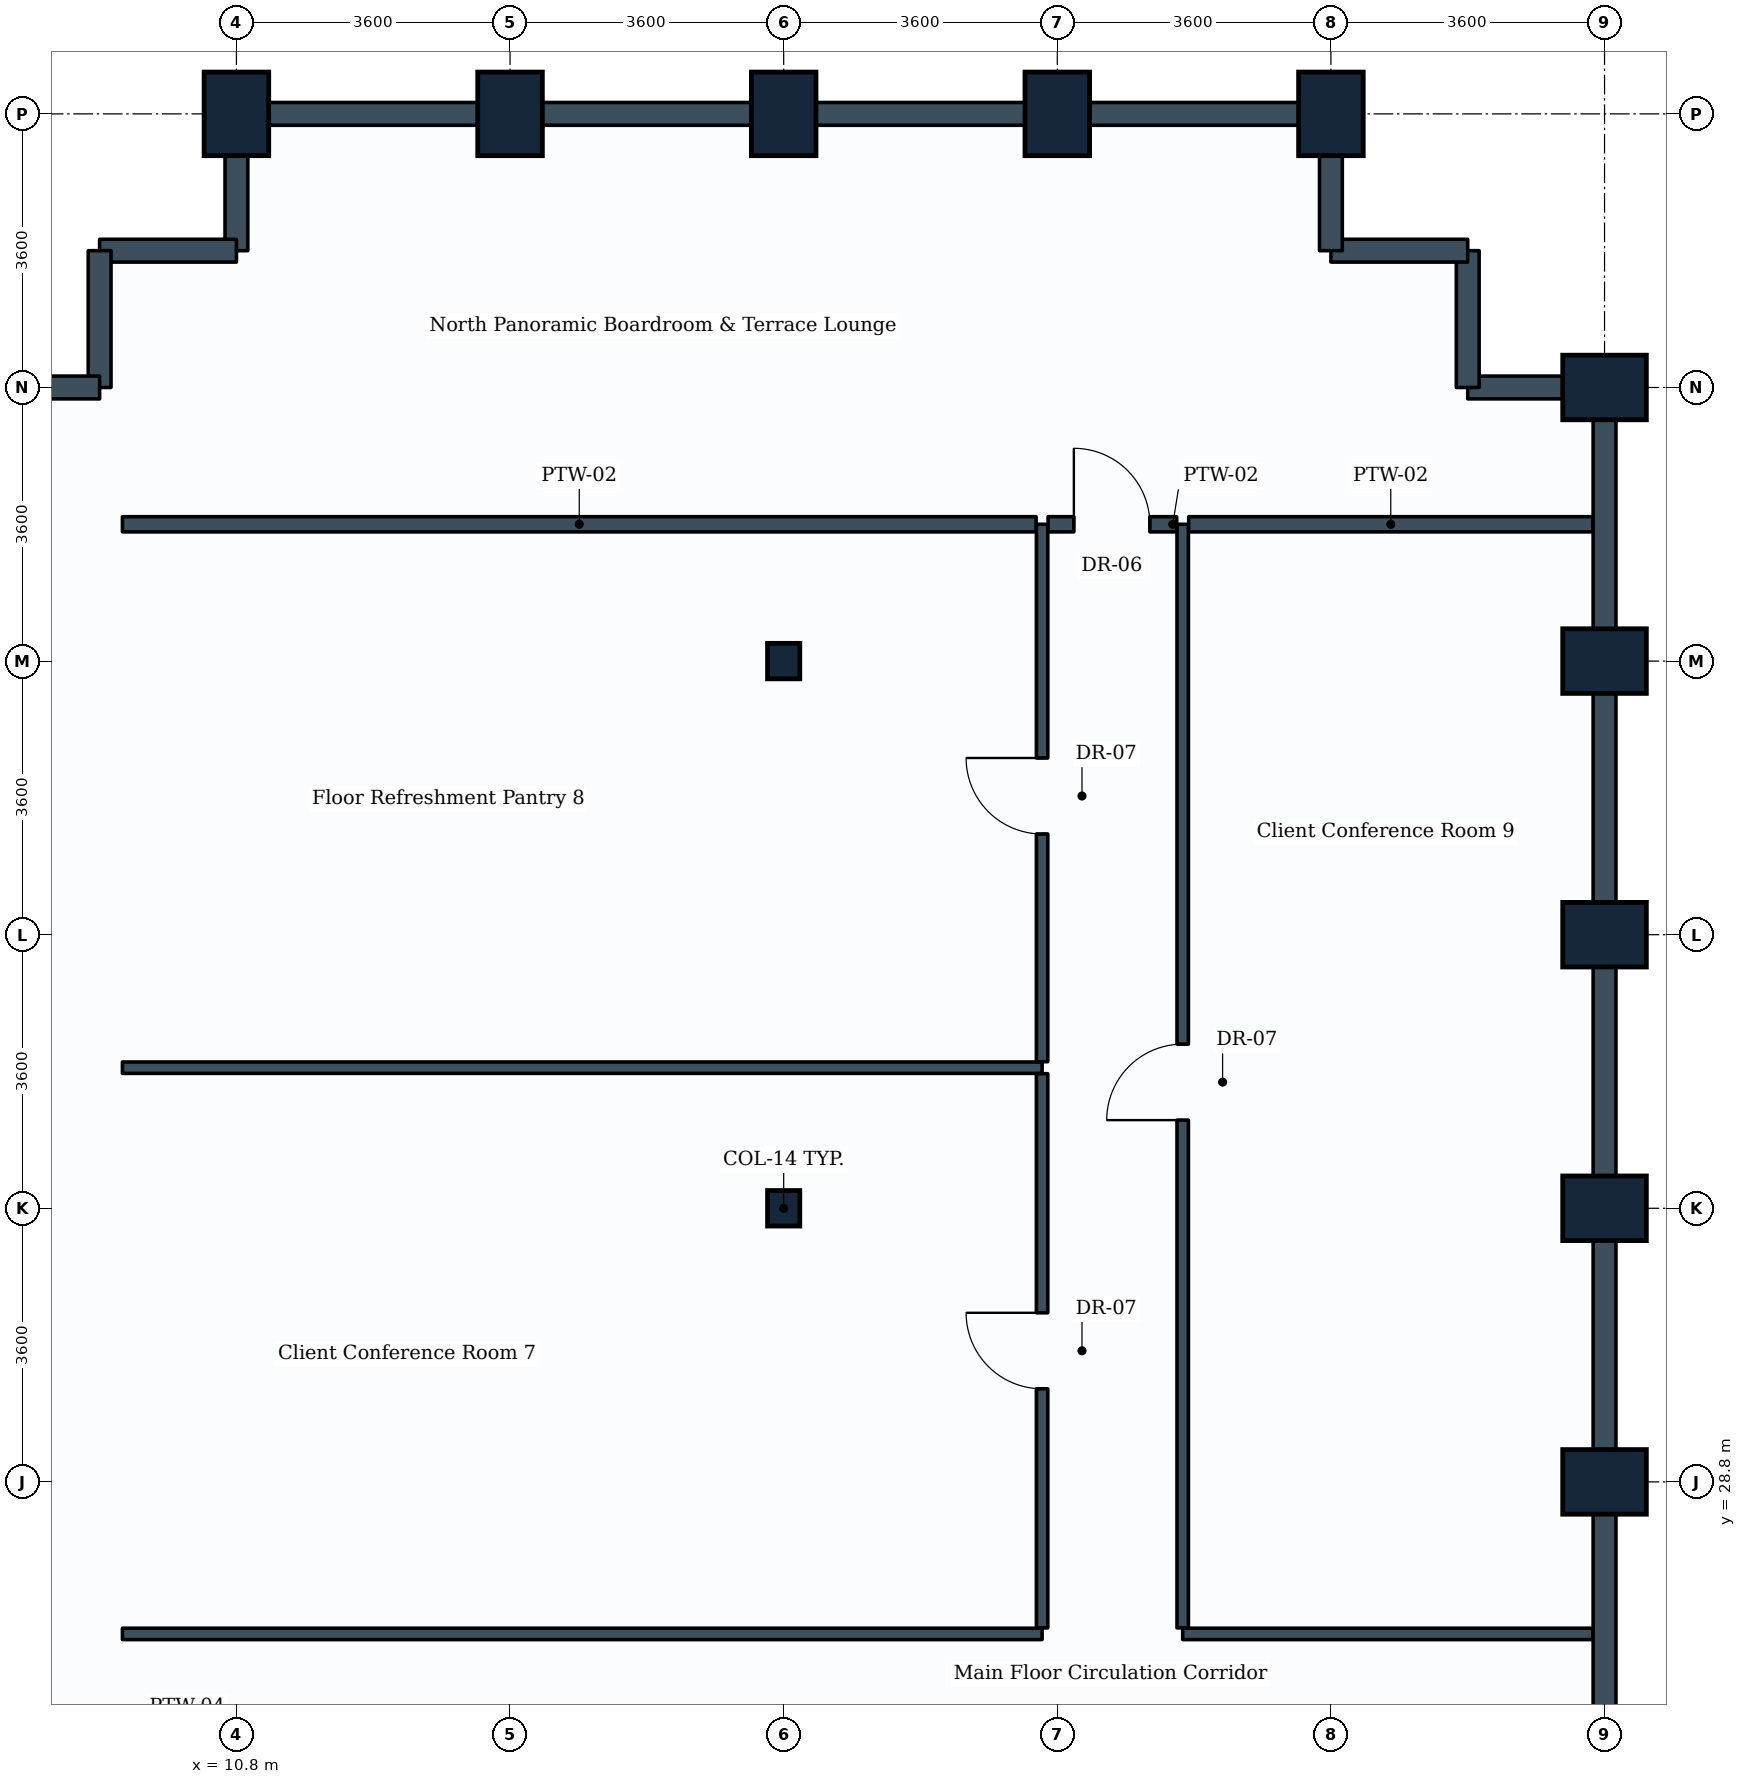
"""IFC4 building model, lengths in metres.
Left out: names, types, materials, properties, quantities, classifications, styles, units other than length and angle.
Written with IfcOpenShell. Run it as: python <this file> out.ifc"""

import sys

from ifc_helpers import new_model, si_unit, direction, frame, frame_2d, origin, origin_2d, place, context, subcontext, project, spatial, rectangle, i_section, extrude, element, fill, save


model = new_model("IFC4")
c1 = context("Model", 3, precision=1e-05, world=origin(), true_north=direction((0.0, 1.0)))
c2 = subcontext(c1, "Body", "Model", "MODEL_VIEW")
j1 = project(units=[si_unit("LENGTHUNIT", "METRE"), si_unit("PLANEANGLEUNIT", "RADIAN")], contexts=[c1])
p1 = place(None, origin())
s1 = spatial("IfcSite", under=j1, at=p1, CompositionType="ELEMENT")
p2 = place(p1, origin())
s2 = spatial("IfcBuilding", under=s1, at=p2, CompositionType="ELEMENT")
p3 = place(p2, frame((0.0, 0.0, 84.0)))
s3 = spatial("IfcBuildingStorey", under=s2, at=p3, CompositionType="ELEMENT", Elevation=84.0)
for number, where, z_axis, x_axis in (
    (1, (10.8, 46.8, 0.0), (0.0, 0.0, 1.0), (1.0, 0.0, 0.0)),
    (2, (14.4, 46.8, 0.0), (0.0, 0.0, 1.0), (1.0, 0.0, 0.0)),
):
    element("IfcColumn", number, at=place(p3, frame(where, z_axis=z_axis, x_axis=x_axis)), inside=s3, PredefinedType="COLUMN", context=c2, shape_type="SweptSolid", body=[
        extrude(rectangle(XDim=0.85, YDim=1.1, at=origin_2d()), origin(), (0.0, 0.0, 1.0), 3.9),
    ])
for number, where, z_axis, x_axis in (
    (3, (18.0, 32.4, 0.0), (0.0, 0.0, 1.0), (1.0, 0.0, 0.0)),
    (4, (18.0, 39.6, 0.0), (0.0, 0.0, 1.0), (1.0, 0.0, 0.0)),
):
    element("IfcColumn", number, at=place(p3, frame(where, z_axis=z_axis, x_axis=x_axis)), inside=s3, PredefinedType="COLUMN", context=c2, shape_type="SweptSolid", body=[
        extrude(i_section(OverallWidth=0.424, OverallDepth=0.467, WebThickness=0.033, FlangeThickness=0.053, FilletRadius=0.015, at=origin_2d()), origin(), (0.0, 0.0, 1.0), 3.9),
    ])
for number, where, z_axis, x_axis in (
    (5, (18.0, 46.8, 0.0), (0.0, 0.0, 1.0), (1.0, 0.0, 0.0)),
    (6, (21.6, 46.8, 0.0), (0.0, 0.0, 1.0), (1.0, 0.0, 0.0)),
    (7, (25.2, 46.8, 0.0), (0.0, 0.0, 1.0), (1.0, 0.0, 0.0)),
    (8, (28.8, 28.8, 0.0), (0.0, 0.0, 1.0), (0.0, 1.0, 0.0)),
    (9, (28.8, 32.4, 0.0), (0.0, 0.0, 1.0), (0.0, 1.0, 0.0)),
    (10, (28.8, 36.0, 0.0), (0.0, 0.0, 1.0), (0.0, 1.0, 0.0)),
    (11, (28.8, 39.6, 0.0), (0.0, 0.0, 1.0), (0.0, 1.0, 0.0)),
    (12, (28.8, 43.2, 0.0), (0.0, 0.0, 1.0), (0.0, 1.0, 0.0)),
):
    element("IfcColumn", number, at=place(p3, frame(where, z_axis=z_axis, x_axis=x_axis)), inside=s3, PredefinedType="COLUMN", context=c2, shape_type="SweptSolid", body=[
        extrude(rectangle(XDim=0.85, YDim=1.1, at=origin_2d()), origin(), (0.0, 0.0, 1.0), 3.9),
    ])
p4 = place(p3, frame((28.8, 28.8, 0.0), z_axis=(0.0, 0.0, 1.0), x_axis=(0.0, -1.0, 0.0)))
e13 = element("IfcWall", 13, at=p4, inside=s3, PredefinedType="STANDARD", context=c2, shape_type="SweptSolid", body=[
    extrude(rectangle(XDim=3.6, YDim=0.3, at=frame_2d((1.8, 0.0))), origin(), (0.0, 0.0, 1.0), 3.19),
])
p5 = place(p3, frame((28.8, 32.4, 0.0), z_axis=(0.0, 0.0, 1.0), x_axis=(0.0, -1.0, 0.0)))
e14 = element("IfcWall", 14, at=p5, inside=s3, PredefinedType="STANDARD", context=c2, shape_type="SweptSolid", body=[
    extrude(rectangle(XDim=3.6, YDim=0.3, at=frame_2d((1.8, 0.0))), origin(), (0.0, 0.0, 1.0), 2.93),
])
for number, where, z_axis, x_axis in (
    (15, (28.8, 36.0, 0.0), (0.0, 0.0, 1.0), (0.0, -1.0, 0.0)),
    (16, (28.8, 39.6, 0.0), (0.0, 0.0, 1.0), (0.0, -1.0, 0.0)),
):
    element("IfcWall", number, at=place(p3, frame(where, z_axis=z_axis, x_axis=x_axis)), inside=s3, PredefinedType="STANDARD", context=c2, shape_type="SweptSolid", body=[
        extrude(rectangle(XDim=3.6, YDim=0.3, at=frame_2d((1.8, 0.0))), origin(), (0.0, 0.0, 1.0), 2.93),
    ])
p6 = place(p3, frame((28.8, 43.2, 0.0), z_axis=(0.0, 0.0, 1.0), x_axis=(0.0, -1.0, 0.0)))
e17 = element("IfcWall", 17, at=p6, inside=s3, PredefinedType="STANDARD", context=c2, shape_type="SweptSolid", body=[
    extrude(rectangle(XDim=3.6, YDim=0.3, at=frame_2d((1.8, 0.0))), origin(), (0.0, 0.0, 1.0), 2.93),
])
p7 = place(p3, frame((27.0, 43.2, 0.0), z_axis=(0.0, 0.0, 1.0), x_axis=(1.0, 0.0, 0.0)))
e18 = element("IfcWall", 18, at=p7, inside=s3, PredefinedType="STANDARD", context=c2, shape_type="SweptSolid", body=[
    extrude(rectangle(XDim=1.8, YDim=0.3, at=frame_2d((0.9, 0.0))), origin(), (0.0, 0.0, 1.0), 2.93),
])
for number, where, z_axis, x_axis in (
    (19, (27.0, 43.2, 0.0), (0.0, 0.0, 1.0), (0.0, 1.0, 0.0)),
    (20, (25.2, 45.0, 0.0), (0.0, 0.0, 1.0), (1.0, 0.0, 0.0)),
):
    element("IfcWall", number, at=place(p3, frame(where, z_axis=z_axis, x_axis=x_axis)), inside=s3, PredefinedType="STANDARD", context=c2, shape_type="SweptSolid", body=[
        extrude(rectangle(XDim=1.8, YDim=0.3, at=frame_2d((0.9, 0.0))), origin(), (0.0, 0.0, 1.0), 3.635),
    ])
p8 = place(p3, frame((25.2, 45.0, 0.0), z_axis=(0.0, 0.0, 1.0), x_axis=(0.0, 1.0, 0.0)))
e21 = element("IfcWall", 21, at=p8, inside=s3, PredefinedType="STANDARD", context=c2, shape_type="SweptSolid", body=[
    extrude(rectangle(XDim=1.8, YDim=0.3, at=frame_2d((0.9, 0.0))), origin(), (0.0, 0.0, 1.0), 2.93),
])
p9 = place(p3, frame((21.6, 46.8, 0.0), z_axis=(0.0, 0.0, 1.0), x_axis=(1.0, 0.0, 0.0)))
e22 = element("IfcWall", 22, at=p9, inside=s3, PredefinedType="STANDARD", context=c2, shape_type="SweptSolid", body=[
    extrude(rectangle(XDim=3.6, YDim=0.3, at=frame_2d((1.8, 0.0))), origin(), (0.0, 0.0, 1.0), 2.93),
])
for number, where, z_axis, x_axis in (
    (23, (18.0, 46.8, 0.0), (0.0, 0.0, 1.0), (1.0, 0.0, 0.0)),
    (24, (14.4, 46.8, 0.0), (0.0, 0.0, 1.0), (1.0, 0.0, 0.0)),
):
    element("IfcWall", number, at=place(p3, frame(where, z_axis=z_axis, x_axis=x_axis)), inside=s3, PredefinedType="STANDARD", context=c2, shape_type="SweptSolid", body=[
        extrude(rectangle(XDim=3.6, YDim=0.3, at=frame_2d((1.8, 0.0))), origin(), (0.0, 0.0, 1.0), 2.93),
    ])
p10 = place(p3, frame((10.8, 46.8, 0.0), z_axis=(0.0, 0.0, 1.0), x_axis=(1.0, 0.0, 0.0)))
e25 = element("IfcWall", 25, at=p10, inside=s3, PredefinedType="STANDARD", context=c2, shape_type="SweptSolid", body=[
    extrude(rectangle(XDim=3.6, YDim=0.3, at=frame_2d((1.8, 0.0))), origin(), (0.0, 0.0, 1.0), 2.93),
])
p11 = place(p3, frame((10.8, 45.0, 0.0), z_axis=(0.0, 0.0, 1.0), x_axis=(0.0, 1.0, 0.0)))
e26 = element("IfcWall", 26, at=p11, inside=s3, PredefinedType="STANDARD", context=c2, shape_type="SweptSolid", body=[
    extrude(rectangle(XDim=1.8, YDim=0.3, at=frame_2d((0.9, 0.0))), origin(), (0.0, 0.0, 1.0), 2.93),
])
for number, where, z_axis, x_axis in (
    (27, (9.0, 45.0, 0.0), (0.0, 0.0, 1.0), (1.0, 0.0, 0.0)),
    (28, (9.0, 43.2, 0.0), (0.0, 0.0, 1.0), (0.0, 1.0, 0.0)),
):
    element("IfcWall", number, at=place(p3, frame(where, z_axis=z_axis, x_axis=x_axis)), inside=s3, PredefinedType="STANDARD", context=c2, shape_type="SweptSolid", body=[
        extrude(rectangle(XDim=1.8, YDim=0.3, at=frame_2d((0.9, 0.0))), origin(), (0.0, 0.0, 1.0), 3.635),
    ])
p12 = place(p3, frame((7.2, 43.2, 0.0), z_axis=(0.0, 0.0, 1.0), x_axis=(1.0, 0.0, 0.0)))
e29 = element("IfcWall", 29, at=p12, inside=s3, PredefinedType="STANDARD", context=c2, shape_type="SweptSolid", body=[
    extrude(rectangle(XDim=1.8, YDim=0.3, at=frame_2d((0.9, 0.0))), origin(), (0.0, 0.0, 1.0), 2.93),
])
for number, where, z_axis, x_axis in (
    (30, (9.3, 26.8, 0.0), (0.0, 0.0, 1.0), (1.0, 0.0, 0.0)),
    (31, (9.3, 34.25, 0.0), (0.0, 0.0, 1.0), (1.0, 0.0, 0.0)),
):
    element("IfcWall", number, at=place(p3, frame(where, z_axis=z_axis, x_axis=x_axis)), inside=s3, PredefinedType="PARTITIONING", context=c2, shape_type="SweptSolid", body=[
        extrude(rectangle(XDim=12.1, YDim=0.15, at=frame_2d((6.05, 0.0))), origin(), (0.0, 0.0, 1.0), 3.18),
    ])
p13 = place(p3, frame((21.4, 26.879, 0.0), z_axis=(0.0, 0.0, 1.0), x_axis=(0.0, 1.0, 0.0)))
e32 = element("IfcWall", 32, at=p13, inside=s3, PredefinedType="PARTITIONING", context=c2, shape_type="SweptSolid", body=[
    extrude(rectangle(XDim=7.292, YDim=0.15, at=frame_2d((3.646, 0.0))), origin(), (0.0, 0.0, 1.0), 3.19),
])
p14 = place(p13, frame((3.146, 0.0, 0.0)))
e33 = element("IfcOpeningElement", 33, at=p14, cuts=e32, PredefinedType="OPENING", context=c2, shape_type="SweptSolid", body=[
    extrude(rectangle(XDim=1.0, YDim=2.1, at=frame_2d((0.5, 1.05))), frame((0.0, 0.085, 0.0), z_axis=(0.0, -1.0, 0.0), x_axis=(1.0, 0.0, 0.0)), (0.0, 0.0, 1.0), 0.17),
])
p15 = place(p3, frame((21.4, 34.329, 0.0), z_axis=(0.0, 0.0, 1.0), x_axis=(0.0, 1.0, 0.0)))
e34 = element("IfcWall", 34, at=p15, inside=s3, PredefinedType="PARTITIONING", context=c2, shape_type="SweptSolid", body=[
    extrude(rectangle(XDim=7.071, YDim=0.15, at=frame_2d((3.535, 0.0))), origin(), (0.0, 0.0, 1.0), 3.18),
])
p16 = place(p15, frame((2.996, 0.0, 0.0)))
e35 = element("IfcOpeningElement", 35, at=p16, cuts=e34, PredefinedType="OPENING", context=c2, shape_type="SweptSolid", body=[
    extrude(rectangle(XDim=1.0, YDim=2.1, at=frame_2d((0.5, 1.05))), frame((0.0, 0.085, 0.0), z_axis=(0.0, -1.0, 0.0), x_axis=(1.0, 0.0, 0.0)), (0.0, 0.0, 1.0), 0.17),
])
p17 = place(p3, frame((23.25, 26.8, 0.0), z_axis=(0.0, 0.0, 1.0), x_axis=(1.0, 0.0, 0.0)))
e36 = element("IfcWall", 36, at=p17, inside=s3, PredefinedType="PARTITIONING", context=c2, shape_type="SweptSolid", body=[
    extrude(rectangle(XDim=5.396, YDim=0.15, at=frame_2d((2.698, 0.0))), origin(), (0.0, 0.0, 1.0), 3.635),
])
p18 = place(p3, frame((23.25, 26.879, 0.0), z_axis=(0.0, 0.0, 1.0), x_axis=(0.0, 1.0, 0.0)))
e37 = element("IfcWall", 37, at=p18, inside=s3, PredefinedType="PARTITIONING", context=c2, shape_type="SweptSolid", body=[
    extrude(rectangle(XDim=14.521, YDim=0.15, at=frame_2d((7.26, 0.0))), origin(), (0.0, 0.0, 1.0), 3.19),
])
p19 = place(p18, frame((6.681, 0.0, 0.0)))
e38 = element("IfcOpeningElement", 38, at=p19, cuts=e37, PredefinedType="OPENING", context=c2, shape_type="SweptSolid", body=[
    extrude(rectangle(XDim=1.0, YDim=2.1, at=frame_2d((0.5, 1.05))), frame((0.0, 0.085, 0.0), z_axis=(0.0, -1.0, 0.0), x_axis=(1.0, 0.0, 0.0)), (0.0, 0.0, 1.0), 0.17),
])
p20 = place(p3, frame((9.3, 41.4, 0.0), z_axis=(0.0, 0.0, 1.0), x_axis=(1.0, 0.0, 0.0)))
e39 = element("IfcWall", 39, at=p20, inside=s3, PredefinedType="PARTITIONING", context=c2, shape_type="SweptSolid", body=[
    extrude(rectangle(XDim=12.021, YDim=0.2, at=frame_2d((6.01, 0.0))), origin(), (0.0, 0.0, 1.0), 3.18),
])
p21 = place(p3, frame((23.329, 41.4, 0.0), z_axis=(0.0, 0.0, 1.0), x_axis=(1.0, 0.0, 0.0)))
e40 = element("IfcWall", 40, at=p21, inside=s3, PredefinedType="PARTITIONING", context=c2, shape_type="SweptSolid", body=[
    extrude(rectangle(XDim=5.317, YDim=0.2, at=frame_2d((2.658, 0.0))), origin(), (0.0, 0.0, 1.0), 2.93),
])
p22 = place(p3, frame((21.479, 41.4, 0.0), z_axis=(0.0, 0.0, 1.0), x_axis=(1.0, 0.0, 0.0)))
e41 = element("IfcWall", 41, at=p22, inside=s3, PredefinedType="PARTITIONING", context=c2, shape_type="SweptSolid", body=[
    extrude(rectangle(XDim=1.692, YDim=0.2, at=frame_2d((0.846, 0.0))), origin(), (0.0, 0.0, 1.0), 3.635),
])
p23 = place(p22, frame((0.339, 0.0, 0.0)))
e42 = element("IfcOpeningElement", 42, at=p23, cuts=e41, PredefinedType="OPENING", context=c2, shape_type="SweptSolid", body=[
    extrude(rectangle(XDim=1.0, YDim=2.1, at=frame_2d((0.5, 1.05))), frame((0.0, 0.11, 0.0), z_axis=(0.0, -1.0, 0.0), x_axis=(1.0, 0.0, 0.0)), (0.0, 0.0, 1.0), 0.22),
])
p24 = place(p14, origin())
e43 = element("IfcDoor", 43, at=p24, inside=s3, OperationType="SINGLE_SWING_RIGHT", PredefinedType="DOOR", context=c2, shape_type="SweptSolid", body=[
    extrude(rectangle(XDim=1.0, YDim=2.1, at=frame_2d((0.5, 1.05))), frame((0.0, 0.025, 0.0), z_axis=(0.0, -1.0, 0.0), x_axis=(1.0, 0.0, 0.0)), (0.0, 0.0, 1.0), 0.05),
])
fill(e33, e43)
p25 = place(p16, origin())
e44 = element("IfcDoor", 44, at=p25, inside=s3, OperationType="SINGLE_SWING_RIGHT", PredefinedType="DOOR", context=c2, shape_type="SweptSolid", body=[
    extrude(rectangle(XDim=1.0, YDim=2.1, at=frame_2d((0.5, 1.05))), frame((0.0, 0.025, 0.0), z_axis=(0.0, -1.0, 0.0), x_axis=(1.0, 0.0, 0.0)), (0.0, 0.0, 1.0), 0.05),
])
fill(e35, e44)
p26 = place(p19, origin())
e45 = element("IfcDoor", 45, at=p26, inside=s3, OperationType="SINGLE_SWING_LEFT", PredefinedType="DOOR", context=c2, shape_type="SweptSolid", body=[
    extrude(rectangle(XDim=1.0, YDim=2.1, at=frame_2d((0.5, 1.05))), frame((0.0, 0.025, 0.0), z_axis=(0.0, -1.0, 0.0), x_axis=(1.0, 0.0, 0.0)), (0.0, 0.0, 1.0), 0.05),
])
fill(e38, e45)
p27 = place(p23, origin())
e46 = element("IfcDoor", 46, at=p27, inside=s3, OperationType="SINGLE_SWING_LEFT", PredefinedType="DOOR", context=c2, shape_type="SweptSolid", body=[
    extrude(rectangle(XDim=1.0, YDim=2.1, at=frame_2d((0.5, 1.05))), frame((0.0, 0.025, 0.0), z_axis=(0.0, -1.0, 0.0), x_axis=(1.0, 0.0, 0.0)), (0.0, 0.0, 1.0), 0.05),
])
fill(e42, e46)
save(model, sys.argv[1])
